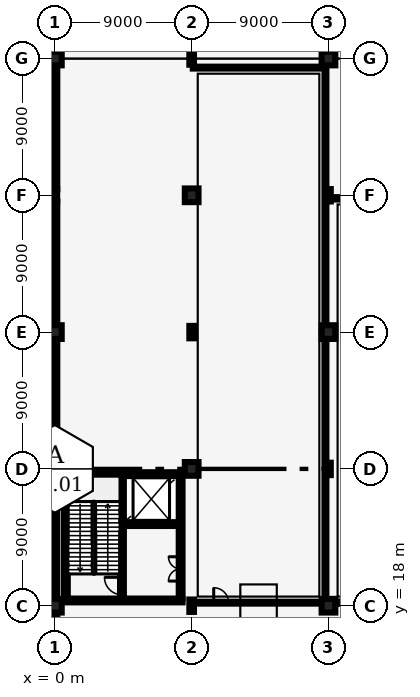
"""IFC4 building model, lengths in metres.
Left out: names, types, materials, properties, quantities, classifications, styles, units other than length and angle.
Written with IfcOpenShell. Run it as: python <this file> out.ifc"""

import sys

from ifc_helpers import new_model, si_unit, direction, frame, frame_2d, origin, origin_2d, place, context, subcontext, project, spatial, rectangle, i_section, extrude, element, fill, save


model = new_model("IFC4")
c1 = context("Model", 3, precision=1e-05, world=origin(), true_north=direction((0.0, 1.0)))
c2 = subcontext(c1, "Body", "Model", "MODEL_VIEW")
j1 = project(units=[si_unit("LENGTHUNIT", "METRE"), si_unit("PLANEANGLEUNIT", "RADIAN")], contexts=[c1])
p1 = place(None, origin())
s1 = spatial("IfcSite", under=j1, at=p1, CompositionType="ELEMENT")
p2 = place(p1, origin())
s2 = spatial("IfcBuilding", under=s1, at=p2, CompositionType="ELEMENT")
p3 = place(p2, origin())
s3 = spatial("IfcBuildingStorey", under=s2, at=p3, CompositionType="ELEMENT", Elevation=0.0)
p4 = place(p3, frame((0.0, 18.0, 0.0), z_axis=(0.0, 0.0, 1.0), x_axis=(1.0, 0.0, 0.0)))
e1 = element("IfcColumn", 1, at=p4, inside=s3, PredefinedType="COLUMN", context=c2, shape_type="SweptSolid", body=[
    extrude(rectangle(XDim=0.9, YDim=0.9, at=origin_2d()), origin(), (0.0, 0.0, 1.0), 6.0),
])
p5 = place(p3, frame((0.0, 27.0, 0.0), z_axis=(0.0, 0.0, 1.0), x_axis=(1.0, 0.0, 0.0)))
e2 = element("IfcColumn", 2, at=p5, inside=s3, PredefinedType="COLUMN", context=c2, shape_type="SweptSolid", body=[
    extrude(i_section(OverallWidth=0.303, OverallDepth=0.814, WebThickness=0.021, FlangeThickness=0.04, FilletRadius=0.03, at=origin_2d()), origin(), (0.0, 0.0, 1.0), 6.0),
])
p6 = place(p3, frame((0.0, 36.0, 0.0), z_axis=(0.0, 0.0, 1.0), x_axis=(1.0, 0.0, 0.0)))
e3 = element("IfcColumn", 3, at=p6, inside=s3, PredefinedType="COLUMN", context=c2, shape_type="SweptSolid", body=[
    extrude(rectangle(XDim=0.9, YDim=0.9, at=origin_2d()), origin(), (0.0, 0.0, 1.0), 6.0),
])
p7 = place(p3, frame((0.0, 45.0, 0.0), z_axis=(0.0, 0.0, 1.0), x_axis=(1.0, 0.0, 0.0)))
e4 = element("IfcColumn", 4, at=p7, inside=s3, PredefinedType="COLUMN", context=c2, shape_type="SweptSolid", body=[
    extrude(i_section(OverallWidth=0.303, OverallDepth=0.814, WebThickness=0.021, FlangeThickness=0.04, FilletRadius=0.03, at=origin_2d()), origin(), (0.0, 0.0, 1.0), 6.0),
])
p8 = place(p3, frame((0.0, 54.0, 0.0), z_axis=(0.0, 0.0, 1.0), x_axis=(1.0, 0.0, 0.0)))
e5 = element("IfcColumn", 5, at=p8, inside=s3, PredefinedType="COLUMN", context=c2, shape_type="SweptSolid", body=[
    extrude(rectangle(XDim=0.9, YDim=0.9, at=origin_2d()), origin(), (0.0, 0.0, 1.0), 6.0),
])
p9 = place(p3, frame((9.0, 18.0, 0.0), z_axis=(0.0, 0.0, 1.0), x_axis=(1.0, 0.0, 0.0)))
e6 = element("IfcColumn", 6, at=p9, inside=s3, PredefinedType="COLUMN", context=c2, shape_type="SweptSolid", body=[
    extrude(i_section(OverallWidth=0.303, OverallDepth=0.814, WebThickness=0.021, FlangeThickness=0.04, FilletRadius=0.03, at=origin_2d()), origin(), (0.0, 0.0, 1.0), 6.0),
])
p10 = place(p3, frame((9.0, 27.0, 0.0), z_axis=(0.0, 0.0, 1.0), x_axis=(1.0, 0.0, 0.0)))
e7 = element("IfcColumn", 7, at=p10, inside=s3, PredefinedType="COLUMN", context=c2, shape_type="SweptSolid", body=[
    extrude(rectangle(XDim=0.9, YDim=0.9, at=origin_2d()), origin(), (0.0, 0.0, 1.0), 6.0),
])
p11 = place(p3, frame((9.0, 36.0, 0.0), z_axis=(0.0, 0.0, 1.0), x_axis=(1.0, 0.0, 0.0)))
e8 = element("IfcColumn", 8, at=p11, inside=s3, PredefinedType="COLUMN", context=c2, shape_type="SweptSolid", body=[
    extrude(i_section(OverallWidth=0.303, OverallDepth=0.814, WebThickness=0.021, FlangeThickness=0.04, FilletRadius=0.03, at=origin_2d()), origin(), (0.0, 0.0, 1.0), 6.0),
])
p12 = place(p3, frame((9.0, 45.0, 0.0), z_axis=(0.0, 0.0, 1.0), x_axis=(1.0, 0.0, 0.0)))
e9 = element("IfcColumn", 9, at=p12, inside=s3, PredefinedType="COLUMN", context=c2, shape_type="SweptSolid", body=[
    extrude(rectangle(XDim=0.9, YDim=0.9, at=origin_2d()), origin(), (0.0, 0.0, 1.0), 6.0),
])
p13 = place(p3, frame((9.0, 54.0, 0.0), z_axis=(0.0, 0.0, 1.0), x_axis=(1.0, 0.0, 0.0)))
e10 = element("IfcColumn", 10, at=p13, inside=s3, PredefinedType="COLUMN", context=c2, shape_type="SweptSolid", body=[
    extrude(i_section(OverallWidth=0.303, OverallDepth=0.814, WebThickness=0.021, FlangeThickness=0.04, FilletRadius=0.03, at=origin_2d()), origin(), (0.0, 0.0, 1.0), 6.0),
])
p14 = place(p3, frame((18.0, 18.0, 0.0), z_axis=(0.0, 0.0, 1.0), x_axis=(1.0, 0.0, 0.0)))
e11 = element("IfcColumn", 11, at=p14, inside=s3, PredefinedType="COLUMN", context=c2, shape_type="SweptSolid", body=[
    extrude(rectangle(XDim=0.9, YDim=0.9, at=origin_2d()), origin(), (0.0, 0.0, 1.0), 6.0),
])
p15 = place(p3, frame((18.0, 27.0, 0.0), z_axis=(0.0, 0.0, 1.0), x_axis=(1.0, 0.0, 0.0)))
e12 = element("IfcColumn", 12, at=p15, inside=s3, PredefinedType="COLUMN", context=c2, shape_type="SweptSolid", body=[
    extrude(i_section(OverallWidth=0.303, OverallDepth=0.814, WebThickness=0.021, FlangeThickness=0.04, FilletRadius=0.03, at=origin_2d()), origin(), (0.0, 0.0, 1.0), 6.0),
])
p16 = place(p3, frame((18.0, 36.0, 0.0), z_axis=(0.0, 0.0, 1.0), x_axis=(1.0, 0.0, 0.0)))
e13 = element("IfcColumn", 13, at=p16, inside=s3, PredefinedType="COLUMN", context=c2, shape_type="SweptSolid", body=[
    extrude(rectangle(XDim=0.9, YDim=0.9, at=origin_2d()), origin(), (0.0, 0.0, 1.0), 6.0),
])
p17 = place(p3, frame((18.0, 45.0, 0.0), z_axis=(0.0, 0.0, 1.0), x_axis=(1.0, 0.0, 0.0)))
e14 = element("IfcColumn", 14, at=p17, inside=s3, PredefinedType="COLUMN", context=c2, shape_type="SweptSolid", body=[
    extrude(i_section(OverallWidth=0.303, OverallDepth=0.814, WebThickness=0.021, FlangeThickness=0.04, FilletRadius=0.03, at=origin_2d()), origin(), (0.0, 0.0, 1.0), 6.0),
])
p18 = place(p3, frame((18.0, 54.0, 0.0), z_axis=(0.0, 0.0, 1.0), x_axis=(1.0, 0.0, 0.0)))
e15 = element("IfcColumn", 15, at=p18, inside=s3, PredefinedType="COLUMN", context=c2, shape_type="SweptSolid", body=[
    extrude(rectangle(XDim=0.9, YDim=0.9, at=origin_2d()), origin(), (0.0, 0.0, 1.0), 6.0),
])
p19 = place(p3, frame((0.0, 9.249, 0.0), z_axis=(0.0, 0.0, 1.0), x_axis=(0.0, 1.0, 0.0)))
e16 = element("IfcWall", 16, at=p19, inside=s3, PredefinedType="SOLIDWALL", context=c2, shape_type="SweptSolid", body=[
    extrude(rectangle(XDim=8.306, YDim=0.32, at=frame_2d((4.153, 0.0))), origin(), (0.0, 0.0, 1.0), 4.95),
])
p20 = place(p19, frame((1.701, 0.0, 0.85)))
e17 = element("IfcOpeningElement", 17, at=p20, cuts=e16, PredefinedType="OPENING", context=c2, shape_type="SweptSolid", body=[
    extrude(rectangle(XDim=2.4, YDim=2.1, at=frame_2d((1.2, 1.05))), frame((0.0, 0.17, 0.0), z_axis=(0.0, -1.0, 0.0), x_axis=(1.0, 0.0, 0.0)), (0.0, 0.0, 1.0), 0.34),
])
p21 = place(p19, frame((5.101, 0.0, 0.85)))
e18 = element("IfcOpeningElement", 18, at=p21, cuts=e16, PredefinedType="OPENING", context=c2, shape_type="SweptSolid", body=[
    extrude(rectangle(XDim=2.2, YDim=2.1, at=frame_2d((1.1, 1.05))), frame((0.0, 0.17, 0.0), z_axis=(0.0, -1.0, 0.0), x_axis=(1.0, 0.0, 0.0)), (0.0, 0.0, 1.0), 0.34),
])
p22 = place(p3, frame((0.0, 18.445, 0.0), z_axis=(0.0, 0.0, 1.0), x_axis=(0.0, 1.0, 0.0)))
e19 = element("IfcWall", 19, at=p22, inside=s3, PredefinedType="SOLIDWALL", context=c2, shape_type="SweptSolid", body=[
    extrude(rectangle(XDim=8.153, YDim=0.32, at=frame_2d((4.076, 0.0))), origin(), (0.0, 0.0, 1.0), 4.95),
])
p23 = place(p3, frame((0.0, 27.402, 0.0), z_axis=(0.0, 0.0, 1.0), x_axis=(0.0, 1.0, 0.0)))
e20 = element("IfcWall", 20, at=p23, inside=s3, PredefinedType="SOLIDWALL", context=c2, shape_type="SweptSolid", body=[
    extrude(rectangle(XDim=8.153, YDim=0.32, at=frame_2d((4.076, 0.0))), origin(), (0.0, 0.0, 1.0), 4.95),
])
p24 = place(p23, frame((1.548, 0.0, 0.85)))
e21 = element("IfcOpeningElement", 21, at=p24, cuts=e20, PredefinedType="OPENING", context=c2, shape_type="SweptSolid", body=[
    extrude(rectangle(XDim=2.0, YDim=2.1, at=frame_2d((1.0, 1.05))), frame((0.0, 0.17, 0.0), z_axis=(0.0, -1.0, 0.0), x_axis=(1.0, 0.0, 0.0)), (0.0, 0.0, 1.0), 0.34),
])
p25 = place(p23, frame((4.948, 0.0, 0.85)))
e22 = element("IfcOpeningElement", 22, at=p25, cuts=e20, PredefinedType="OPENING", context=c2, shape_type="SweptSolid", body=[
    extrude(rectangle(XDim=1.8, YDim=2.1, at=frame_2d((0.9, 1.05))), frame((0.0, 0.17, 0.0), z_axis=(0.0, -1.0, 0.0), x_axis=(1.0, 0.0, 0.0)), (0.0, 0.0, 1.0), 0.34),
])
p26 = place(p3, frame((0.0, 36.445, 0.0), z_axis=(0.0, 0.0, 1.0), x_axis=(0.0, 1.0, 0.0)))
e23 = element("IfcWall", 23, at=p26, inside=s3, PredefinedType="SOLIDWALL", context=c2, shape_type="SweptSolid", body=[
    extrude(rectangle(XDim=8.153, YDim=0.32, at=frame_2d((4.076, 0.0))), origin(), (0.0, 0.0, 1.0), 4.95),
])
p27 = place(p26, frame((1.505, 0.0, 0.85)))
e24 = element("IfcOpeningElement", 24, at=p27, cuts=e23, PredefinedType="OPENING", context=c2, shape_type="SweptSolid", body=[
    extrude(rectangle(XDim=1.6, YDim=2.1, at=frame_2d((0.8, 1.05))), frame((0.0, 0.17, 0.0), z_axis=(0.0, -1.0, 0.0), x_axis=(1.0, 0.0, 0.0)), (0.0, 0.0, 1.0), 0.34),
])
p28 = place(p26, frame((4.905, 0.0, 0.85)))
e25 = element("IfcOpeningElement", 25, at=p28, cuts=e23, PredefinedType="OPENING", context=c2, shape_type="SweptSolid", body=[
    extrude(rectangle(XDim=1.4, YDim=2.1, at=frame_2d((0.7, 1.05))), frame((0.0, 0.17, 0.0), z_axis=(0.0, -1.0, 0.0), x_axis=(1.0, 0.0, 0.0)), (0.0, 0.0, 1.0), 0.34),
])
p29 = place(p3, frame((0.0, 45.402, 0.0), z_axis=(0.0, 0.0, 1.0), x_axis=(0.0, 1.0, 0.0)))
e26 = element("IfcWall", 26, at=p29, inside=s3, PredefinedType="SOLIDWALL", context=c2, shape_type="SweptSolid", body=[
    extrude(rectangle(XDim=8.153, YDim=0.32, at=frame_2d((4.076, 0.0))), origin(), (0.0, 0.0, 1.0), 4.95),
])
p30 = place(p29, frame((1.548, 0.0, 0.85)))
e27 = element("IfcOpeningElement", 27, at=p30, cuts=e26, PredefinedType="OPENING", context=c2, shape_type="SweptSolid", body=[
    extrude(rectangle(XDim=2.7, YDim=1.8, at=frame_2d((1.35, 0.9))), frame((0.0, 0.17, 0.0), z_axis=(0.0, -1.0, 0.0), x_axis=(1.0, 0.0, 0.0)), (0.0, 0.0, 1.0), 0.34),
])
p31 = place(p29, frame((4.948, 0.0, 0.85)))
e28 = element("IfcOpeningElement", 28, at=p31, cuts=e26, PredefinedType="OPENING", context=c2, shape_type="SweptSolid", body=[
    extrude(rectangle(XDim=2.5, YDim=1.8, at=frame_2d((1.25, 0.9))), frame((0.0, 0.17, 0.0), z_axis=(0.0, -1.0, 0.0), x_axis=(1.0, 0.0, 0.0)), (0.0, 0.0, 1.0), 0.34),
])
p32 = place(p3, frame((0.725, 18.47, 0.0), z_axis=(0.0, 0.0, 1.0), x_axis=(0.0, 1.0, 0.0)))
e29 = element("IfcWall", 29, at=p32, inside=s3, PredefinedType="SHEAR", context=c2, shape_type="SweptSolid", body=[
    extrude(rectangle(XDim=8.06, YDim=0.25, at=frame_2d((4.03, 0.0))), origin(), (0.0, 0.0, 1.0), 5.7),
])
p33 = place(p3, frame((8.275, 18.47, 0.0), z_axis=(0.0, 0.0, 1.0), x_axis=(0.0, 1.0, 0.0)))
e30 = element("IfcWall", 30, at=p33, inside=s3, PredefinedType="SHEAR", context=c2, shape_type="SweptSolid", body=[
    extrude(rectangle(XDim=8.06, YDim=0.25, at=frame_2d((4.03, 0.0))), origin(), (0.0, 0.0, 1.0), 5.7),
])
p34 = place(p33, frame((1.15, 0.0, 0.0)))
e31 = element("IfcOpeningElement", 31, at=p34, cuts=e30, PredefinedType="OPENING", context=c2, shape_type="SweptSolid", body=[
    extrude(rectangle(XDim=1.6, YDim=2.2, at=frame_2d((0.8, 1.1))), frame((0.0, 0.135, 0.0), z_axis=(0.0, -1.0, 0.0), x_axis=(1.0, 0.0, 0.0)), (0.0, 0.0, 1.0), 0.27),
])
for number, where, z_axis, x_axis in (
    (32, (0.6, 18.345, 0.0), (0.0, 0.0, 1.0), (1.0, 0.0, 0.0)),
    (33, (0.6, 26.655, 0.0), (0.0, 0.0, 1.0), (1.0, 0.0, 0.0)),
):
    element("IfcWall", number, at=place(p3, frame(where, z_axis=z_axis, x_axis=x_axis)), inside=s3, PredefinedType="SHEAR", context=c2, shape_type="SweptSolid", body=[
        extrude(rectangle(XDim=7.8, YDim=0.25, at=frame_2d((3.9, 0.0))), origin(), (0.0, 0.0, 1.0), 5.7),
    ])
p35 = place(p3, frame((4.415, 18.47, 0.0), z_axis=(0.0, 0.0, 1.0), x_axis=(0.0, 1.0, 0.0)))
e34 = element("IfcWall", 34, at=p35, inside=s3, PredefinedType="SHEAR", context=c2, shape_type="SweptSolid", body=[
    extrude(rectangle(XDim=8.06, YDim=0.25, at=frame_2d((4.03, 0.0))), origin(), (0.0, 0.0, 1.0), 5.7),
])
p36 = place(p35, frame((0.25, 0.0, 0.0)))
e35 = element("IfcOpeningElement", 35, at=p36, cuts=e34, PredefinedType="OPENING", context=c2, shape_type="SweptSolid", body=[
    extrude(rectangle(XDim=1.15, YDim=2.15, at=frame_2d((0.575, 1.075))), frame((0.0, 0.135, 0.0), z_axis=(0.0, -1.0, 0.0), x_axis=(1.0, 0.0, 0.0)), (0.0, 0.0, 1.0), 0.27),
])
p37 = place(p3, frame((4.54, 23.37, 0.0), z_axis=(0.0, 0.0, 1.0), x_axis=(1.0, 0.0, 0.0)))
e36 = element("IfcWall", 36, at=p37, inside=s3, PredefinedType="SHEAR", context=c2, shape_type="SweptSolid", body=[
    extrude(rectangle(XDim=3.61, YDim=0.25, at=frame_2d((1.805, 0.0))), origin(), (0.0, 0.0, 1.0), 5.7),
])
p38 = place(p37, frame((0.5, 0.0, 0.0)))
e37 = element("IfcOpeningElement", 37, at=p38, cuts=e36, PredefinedType="OPENING", context=c2, shape_type="SweptSolid", body=[
    extrude(rectangle(XDim=2.2, YDim=2.4, at=frame_2d((1.1, 1.2))), frame((0.0, 0.135, 0.0), z_axis=(0.0, -1.0, 0.0), x_axis=(1.0, 0.0, 0.0)), (0.0, 0.0, 1.0), 0.27),
])
p39 = place(p3, frame((18.2, 18.2, 0.0), z_axis=(0.0, 0.0, 1.0), x_axis=(1.0, 0.0, 0.0)))
e38 = element("IfcWall", 38, at=p39, inside=s3, PredefinedType="PARTITIONING", context=c2, shape_type="SweptSolid", body=[
    extrude(rectangle(XDim=35.6, YDim=0.155, at=frame_2d((17.8, 0.0))), origin(), (0.0, 0.0, 1.0), 4.85),
])
p40 = place(p39, frame((1.15, 0.0, 0.0)))
e39 = element("IfcOpeningElement", 39, at=p40, cuts=e38, PredefinedType="OPENING", context=c2, shape_type="SweptSolid", body=[
    extrude(rectangle(XDim=1.02, YDim=2.15, at=frame_2d((0.51, 1.075))), frame((0.0, 0.087, 0.0), z_axis=(0.0, -1.0, 0.0), x_axis=(1.0, 0.0, 0.0)), (0.0, 0.0, 1.0), 0.175),
])
p41 = place(p3, frame((18.293, 44.8, 0.0), z_axis=(0.0, 0.0, 1.0), x_axis=(1.0, 0.0, 0.0)))
e40 = element("IfcWall", 40, at=p41, inside=s3, PredefinedType="PARTITIONING", context=c2, shape_type="SweptSolid", body=[
    extrude(rectangle(XDim=35.414, YDim=0.155, at=frame_2d((17.707, 0.0))), origin(), (0.0, 0.0, 1.0), 4.85),
])
p42 = place(p3, frame((9.0, 18.2, 0.0), z_axis=(0.0, 0.0, 1.0), x_axis=(1.0, 0.0, 0.0)))
e41 = element("IfcWall", 41, at=p42, inside=s3, PredefinedType="PARTITIONING", context=c2, shape_type="SweptSolid", body=[
    extrude(rectangle(XDim=8.8, YDim=0.125, at=frame_2d((4.4, 0.0))), origin(), (0.0, 0.0, 1.0), 4.85),
])
p43 = place(p42, frame((1.45, 0.0, 0.0)))
e42 = element("IfcOpeningElement", 42, at=p43, cuts=e41, PredefinedType="OPENING", context=c2, shape_type="SweptSolid", body=[
    extrude(rectangle(XDim=0.98, YDim=2.12, at=frame_2d((0.49, 1.06))), frame((0.0, 0.073, 0.0), z_axis=(0.0, -1.0, 0.0), x_axis=(1.0, 0.0, 0.0)), (0.0, 0.0, 1.0), 0.145),
])
p44 = place(p3, frame((9.075, 53.4, 0.0), z_axis=(0.0, 0.0, 1.0), x_axis=(1.0, 0.0, 0.0)))
e43 = element("IfcWall", 43, at=p44, inside=s3, PredefinedType="PARTITIONING", context=c2, shape_type="SweptSolid", body=[
    extrude(rectangle(XDim=8.65, YDim=0.125, at=frame_2d((4.325, 0.0))), origin(), (0.0, 0.0, 1.0), 4.85),
])
p45 = place(p3, frame((17.8, 18.275, 0.0), z_axis=(0.0, 0.0, 1.0), x_axis=(0.0, 1.0, 0.0)))
e44 = element("IfcWall", 44, at=p45, inside=s3, PredefinedType="PARTITIONING", context=c2, shape_type="SweptSolid", body=[
    extrude(rectangle(XDim=35.05, YDim=0.125, at=frame_2d((17.525, 0.0))), origin(), (0.0, 0.0, 1.0), 4.85),
])
p46 = place(p24, origin())
e45 = element("IfcWindow", 45, at=p46, inside=s3, PartitioningType="SINGLE_PANEL", PredefinedType="WINDOW", context=c2, shape_type="SweptSolid", body=[
    extrude(rectangle(XDim=2.0, YDim=2.1, at=frame_2d((1.0, 1.05))), frame((0.0, 0.03, 0.0), z_axis=(0.0, -1.0, 0.0), x_axis=(1.0, 0.0, 0.0)), (0.0, 0.0, 1.0), 0.06),
])
fill(e21, e45)
p47 = place(p25, origin())
e46 = element("IfcWindow", 46, at=p47, inside=s3, PartitioningType="SINGLE_PANEL", PredefinedType="WINDOW", context=c2, shape_type="SweptSolid", body=[
    extrude(rectangle(XDim=1.8, YDim=2.1, at=frame_2d((0.9, 1.05))), frame((0.0, 0.03, 0.0), z_axis=(0.0, -1.0, 0.0), x_axis=(1.0, 0.0, 0.0)), (0.0, 0.0, 1.0), 0.06),
])
fill(e22, e46)
p48 = place(p27, origin())
e47 = element("IfcWindow", 47, at=p48, inside=s3, PartitioningType="SINGLE_PANEL", PredefinedType="WINDOW", context=c2, shape_type="SweptSolid", body=[
    extrude(rectangle(XDim=1.6, YDim=2.1, at=frame_2d((0.8, 1.05))), frame((0.0, 0.03, 0.0), z_axis=(0.0, -1.0, 0.0), x_axis=(1.0, 0.0, 0.0)), (0.0, 0.0, 1.0), 0.06),
])
fill(e24, e47)
p49 = place(p28, origin())
e48 = element("IfcWindow", 48, at=p49, inside=s3, PartitioningType="SINGLE_PANEL", PredefinedType="WINDOW", context=c2, shape_type="SweptSolid", body=[
    extrude(rectangle(XDim=1.4, YDim=2.1, at=frame_2d((0.7, 1.05))), frame((0.0, 0.03, 0.0), z_axis=(0.0, -1.0, 0.0), x_axis=(1.0, 0.0, 0.0)), (0.0, 0.0, 1.0), 0.06),
])
fill(e25, e48)
p50 = place(p30, origin())
e49 = element("IfcWindow", 49, at=p50, inside=s3, PartitioningType="SINGLE_PANEL", PredefinedType="WINDOW", context=c2, shape_type="SweptSolid", body=[
    extrude(rectangle(XDim=2.7, YDim=1.8, at=frame_2d((1.35, 0.9))), frame((0.0, 0.03, 0.0), z_axis=(0.0, -1.0, 0.0), x_axis=(1.0, 0.0, 0.0)), (0.0, 0.0, 1.0), 0.06),
])
fill(e27, e49)
p51 = place(p31, origin())
e50 = element("IfcWindow", 50, at=p51, inside=s3, PartitioningType="SINGLE_PANEL", PredefinedType="WINDOW", context=c2, shape_type="SweptSolid", body=[
    extrude(rectangle(XDim=2.5, YDim=1.8, at=frame_2d((1.25, 0.9))), frame((0.0, 0.03, 0.0), z_axis=(0.0, -1.0, 0.0), x_axis=(1.0, 0.0, 0.0)), (0.0, 0.0, 1.0), 0.06),
])
fill(e28, e50)
p52 = place(p36, origin())
e51 = element("IfcDoor", 51, at=p52, inside=s3, OperationType="SINGLE_SWING_RIGHT", PredefinedType="DOOR", context=c2, shape_type="SweptSolid", body=[
    extrude(rectangle(XDim=1.15, YDim=2.15, at=frame_2d((0.575, 1.075))), frame((0.0, 0.025, 0.0), z_axis=(0.0, -1.0, 0.0), x_axis=(1.0, 0.0, 0.0)), (0.0, 0.0, 1.0), 0.05),
])
fill(e35, e51)
p53 = place(p38, origin())
e52 = element("IfcDoor", 52, at=p53, inside=s3, OperationType="DOUBLE_DOOR_SLIDING", PredefinedType="DOOR", context=c2, shape_type="SweptSolid", body=[
    extrude(rectangle(XDim=2.2, YDim=2.4, at=frame_2d((1.1, 1.2))), frame((0.0, 0.025, 0.0), z_axis=(0.0, -1.0, 0.0), x_axis=(1.0, 0.0, 0.0)), (0.0, 0.0, 1.0), 0.05),
])
fill(e37, e52)
p54 = place(p34, origin())
e53 = element("IfcDoor", 53, at=p54, inside=s3, OperationType="DOUBLE_DOOR_SINGLE_SWING", PredefinedType="DOOR", context=c2, shape_type="SweptSolid", body=[
    extrude(rectangle(XDim=1.6, YDim=2.2, at=frame_2d((0.8, 1.1))), frame((0.0, 0.025, 0.0), z_axis=(0.0, -1.0, 0.0), x_axis=(1.0, 0.0, 0.0)), (0.0, 0.0, 1.0), 0.05),
])
fill(e31, e53)
p55 = place(p43, origin())
e54 = element("IfcDoor", 54, at=p55, inside=s3, OperationType="SINGLE_SWING_LEFT", PredefinedType="DOOR", context=c2, shape_type="SweptSolid", body=[
    extrude(rectangle(XDim=0.98, YDim=2.12, at=frame_2d((0.49, 1.06))), frame((0.0, 0.025, 0.0), z_axis=(0.0, -1.0, 0.0), x_axis=(1.0, 0.0, 0.0)), (0.0, 0.0, 1.0), 0.05),
])
fill(e42, e54)
save(model, sys.argv[1])
